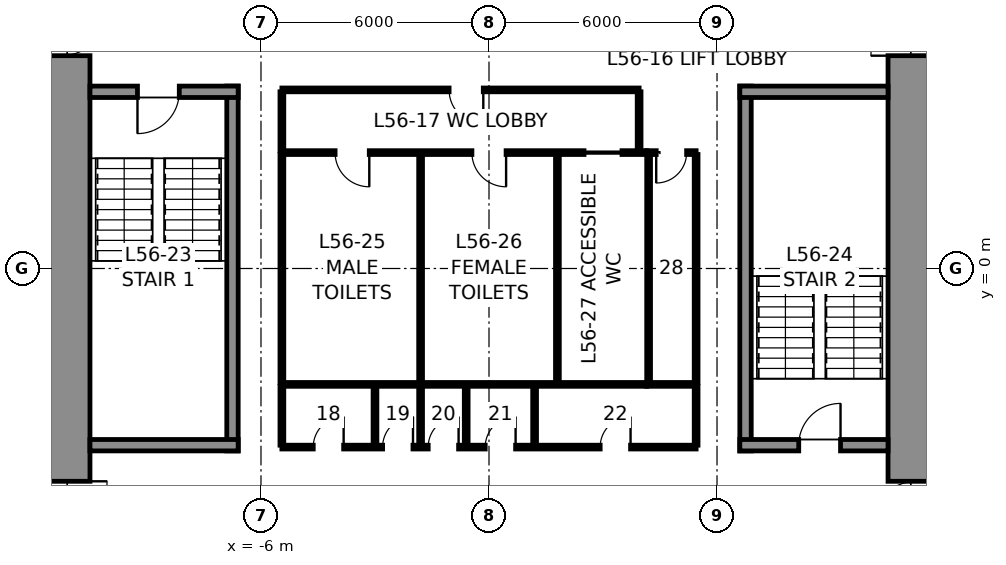
"""IFC4 building model, lengths in metres.
Left out: names, types, materials, properties, quantities, classifications, styles, units other than length and angle.
Written with IfcOpenShell. Run it as: python <this file> out.ifc"""

import sys

from ifc_helpers import new_model, si_unit, direction, frame, frame_2d, origin, place, context, subcontext, project, spatial, rectangle, extrude, element, fill, save


model = new_model("IFC4")
c1 = context("Model", 3, precision=1e-05, world=origin(), true_north=direction((0.0, 1.0)))
c2 = subcontext(c1, "Body", "Model", "MODEL_VIEW")
j1 = project(units=[si_unit("LENGTHUNIT", "METRE"), si_unit("PLANEANGLEUNIT", "RADIAN")], contexts=[c1])
p1 = place(None, origin())
s1 = spatial("IfcSite", under=j1, at=p1, CompositionType="ELEMENT")
p2 = place(p1, origin())
s2 = spatial("IfcBuilding", under=s1, at=p2, CompositionType="ELEMENT")
p3 = place(p2, frame((0.0, 0.0, 253.8)))
s3 = spatial("IfcBuildingStorey", under=s2, at=p3, CompositionType="ELEMENT", Elevation=253.8)
p4 = place(p3, frame((11.25, 10.5, 0.0), z_axis=(0.0, 0.0, 1.0), x_axis=(0.0, -1.0, 0.0)))
e1 = element("IfcWall", 1, at=p4, inside=s3, PredefinedType="SHEAR", context=c2, shape_type="SweptSolid", body=[
    extrude(rectangle(XDim=21.0, YDim=1.5, at=frame_2d((10.5, 0.0))), origin(), (0.0, 0.0, 1.0), 4.0),
])
p5 = place(p4, frame((3.7, 0.0, 0.0)))
e2 = element("IfcOpeningElement", 2, at=p5, cuts=e1, PredefinedType="OPENING", context=c2, shape_type="SweptSolid", body=[
    extrude(rectangle(XDim=1.2, YDim=2.3, at=frame_2d((0.6, 1.15))), frame((0.0, 0.76, 0.0), z_axis=(0.0, -1.0, 0.0), x_axis=(1.0, 0.0, 0.0)), (0.0, 0.0, 1.0), 1.52),
])
p6 = place(p4, frame((16.1, 0.0, 0.0)))
e3 = element("IfcOpeningElement", 3, at=p6, cuts=e1, PredefinedType="OPENING", context=c2, shape_type="SweptSolid", body=[
    extrude(rectangle(XDim=1.2, YDim=2.3, at=frame_2d((0.6, 1.15))), frame((0.0, 0.76, 0.0), z_axis=(0.0, -1.0, 0.0), x_axis=(1.0, 0.0, 0.0)), (0.0, 0.0, 1.0), 1.52),
])
p7 = place(p3, frame((-11.25, -10.5, 0.0), z_axis=(0.0, 0.0, 1.0), x_axis=(0.0, 1.0, 0.0)))
e4 = element("IfcWall", 4, at=p7, inside=s3, PredefinedType="SHEAR", context=c2, shape_type="SweptSolid", body=[
    extrude(rectangle(XDim=21.0, YDim=1.5, at=frame_2d((10.5, 0.0))), origin(), (0.0, 0.0, 1.0), 4.0),
])
p8 = place(p7, frame((16.1, 0.0, 0.0)))
e5 = element("IfcOpeningElement", 5, at=p8, cuts=e4, PredefinedType="OPENING", context=c2, shape_type="SweptSolid", body=[
    extrude(rectangle(XDim=1.2, YDim=2.3, at=frame_2d((0.6, 1.15))), frame((0.0, 0.76, 0.0), z_axis=(0.0, -1.0, 0.0), x_axis=(1.0, 0.0, 0.0)), (0.0, 0.0, 1.0), 1.52),
])
p9 = place(p7, frame((3.7, 0.0, 0.0)))
e6 = element("IfcOpeningElement", 6, at=p9, cuts=e4, PredefinedType="OPENING", context=c2, shape_type="SweptSolid", body=[
    extrude(rectangle(XDim=1.2, YDim=2.3, at=frame_2d((0.6, 1.15))), frame((0.0, 0.76, 0.0), z_axis=(0.0, -1.0, 0.0), x_axis=(1.0, 0.0, 0.0)), (0.0, 0.0, 1.0), 1.52),
])
p10 = place(p3, frame((-6.75, -4.8, 0.0), z_axis=(0.0, 0.0, 1.0), x_axis=(0.0, 1.0, 0.0)))
e7 = element("IfcWall", 7, at=p10, inside=s3, PredefinedType="SOLIDWALL", context=c2, shape_type="SweptSolid", body=[
    extrude(rectangle(XDim=9.6, YDim=0.3, at=frame_2d((4.8, 0.0))), origin(), (0.0, 0.0, 1.0), 3.75),
])
p11 = place(p3, frame((-10.5, 4.65, 0.0), z_axis=(0.0, 0.0, 1.0), x_axis=(1.0, 0.0, 0.0)))
e8 = element("IfcWall", 8, at=p11, inside=s3, PredefinedType="SOLIDWALL", context=c2, shape_type="SweptSolid", body=[
    extrude(rectangle(XDim=3.9, YDim=0.3, at=frame_2d((1.95, 0.0))), origin(), (0.0, 0.0, 1.0), 3.75),
])
p12 = place(p11, frame((1.25, 0.0, 0.0)))
e9 = element("IfcOpeningElement", 9, at=p12, cuts=e8, PredefinedType="OPENING", context=c2, shape_type="SweptSolid", body=[
    extrude(rectangle(XDim=1.1, YDim=2.3, at=frame_2d((0.55, 1.15))), frame((0.0, 0.16, 0.0), z_axis=(0.0, -1.0, 0.0), x_axis=(1.0, 0.0, 0.0)), (0.0, 0.0, 1.0), 0.32),
])
p13 = place(p3, frame((-6.6, -4.65, 0.0), z_axis=(0.0, 0.0, 1.0), x_axis=(-1.0, 0.0, 0.0)))
e10 = element("IfcWall", 10, at=p13, inside=s3, PredefinedType="SOLIDWALL", context=c2, shape_type="SweptSolid", body=[
    extrude(rectangle(XDim=3.9, YDim=0.3, at=frame_2d((1.95, 0.0))), origin(), (0.0, 0.0, 1.0), 3.75),
])
p14 = place(p3, frame((6.75, -4.8, 0.0), z_axis=(0.0, 0.0, 1.0), x_axis=(0.0, 1.0, 0.0)))
e11 = element("IfcWall", 11, at=p14, inside=s3, PredefinedType="SOLIDWALL", context=c2, shape_type="SweptSolid", body=[
    extrude(rectangle(XDim=9.6, YDim=0.3, at=frame_2d((4.8, 0.0))), origin(), (0.0, 0.0, 1.0), 3.75),
])
p15 = place(p3, frame((6.6, 4.65, 0.0), z_axis=(0.0, 0.0, 1.0), x_axis=(1.0, 0.0, 0.0)))
e12 = element("IfcWall", 12, at=p15, inside=s3, PredefinedType="SOLIDWALL", context=c2, shape_type="SweptSolid", body=[
    extrude(rectangle(XDim=3.9, YDim=0.3, at=frame_2d((1.95, 0.0))), origin(), (0.0, 0.0, 1.0), 3.75),
])
p16 = place(p3, frame((10.5, -4.65, 0.0), z_axis=(0.0, 0.0, 1.0), x_axis=(-1.0, 0.0, 0.0)))
e13 = element("IfcWall", 13, at=p16, inside=s3, PredefinedType="SOLIDWALL", context=c2, shape_type="SweptSolid", body=[
    extrude(rectangle(XDim=3.9, YDim=0.3, at=frame_2d((1.95, 0.0))), origin(), (0.0, 0.0, 1.0), 3.75),
])
p17 = place(p16, frame((1.25, 0.0, 0.0)))
e14 = element("IfcOpeningElement", 14, at=p17, cuts=e13, PredefinedType="OPENING", context=c2, shape_type="SweptSolid", body=[
    extrude(rectangle(XDim=1.1, YDim=2.3, at=frame_2d((0.55, 1.15))), frame((0.0, 0.16, 0.0), z_axis=(0.0, -1.0, 0.0), x_axis=(1.0, 0.0, 0.0)), (0.0, 0.0, 1.0), 0.32),
])
p18 = place(p3, frame((-5.45, 3.05, 0.0), z_axis=(0.0, 0.0, 1.0), x_axis=(1.0, 0.0, 0.0)))
e15 = element("IfcWall", 15, at=p18, inside=s3, PredefinedType="PARTITIONING", context=c2, shape_type="SweptSolid", body=[
    extrude(rectangle(XDim=9.6, YDim=0.1, at=frame_2d((4.8, 0.0))), origin(), (0.0, 0.0, 1.0), 3.75),
])
p19 = place(p18, frame((1.4, 0.0, 0.0)))
e16 = element("IfcOpeningElement", 16, at=p19, cuts=e15, PredefinedType="OPENING", context=c2, shape_type="SweptSolid", body=[
    extrude(rectangle(XDim=0.9, YDim=2.3, at=frame_2d((0.45, 1.15))), frame((0.0, 0.06, 0.0), z_axis=(0.0, -1.0, 0.0), x_axis=(1.0, 0.0, 0.0)), (0.0, 0.0, 1.0), 0.12),
])
p20 = place(p18, frame((5.0, 0.0, 0.0)))
e17 = element("IfcOpeningElement", 17, at=p20, cuts=e15, PredefinedType="OPENING", context=c2, shape_type="SweptSolid", body=[
    extrude(rectangle(XDim=0.9, YDim=2.3, at=frame_2d((0.45, 1.15))), frame((0.0, 0.06, 0.0), z_axis=(0.0, -1.0, 0.0), x_axis=(1.0, 0.0, 0.0)), (0.0, 0.0, 1.0), 0.12),
])
p21 = place(p18, frame((7.95, 0.0, 0.0)))
e18 = element("IfcOpeningElement", 18, at=p21, cuts=e15, PredefinedType="OPENING", context=c2, shape_type="SweptSolid", body=[
    extrude(rectangle(XDim=1.0, YDim=2.3, at=frame_2d((0.5, 1.15))), frame((0.0, 0.06, 0.0), z_axis=(0.0, -1.0, 0.0), x_axis=(1.0, 0.0, 0.0)), (0.0, 0.0, 1.0), 0.12),
])
p22 = place(p3, frame((4.15, 3.05, 0.0), z_axis=(0.0, 0.0, 1.0), x_axis=(1.0, 0.0, 0.0)))
e19 = element("IfcWall", 19, at=p22, inside=s3, PredefinedType="PARTITIONING", context=c2, shape_type="SweptSolid", body=[
    extrude(rectangle(XDim=1.3, YDim=0.1, at=frame_2d((0.65, 0.0))), origin(), (0.0, 0.0, 1.0), 3.75),
])
p23 = place(p22, frame((0.25, 0.0, 0.0)))
e20 = element("IfcOpeningElement", 20, at=p23, cuts=e19, PredefinedType="OPENING", context=c2, shape_type="SweptSolid", body=[
    extrude(rectangle(XDim=0.8, YDim=2.3, at=frame_2d((0.4, 1.15))), frame((0.0, 0.06, 0.0), z_axis=(0.0, -1.0, 0.0), x_axis=(1.0, 0.0, 0.0)), (0.0, 0.0, 1.0), 0.12),
])
p24 = place(p3, frame((4.15, -3.05, 0.0), z_axis=(0.0, 0.0, 1.0), x_axis=(-1.0, 0.0, 0.0)))
e21 = element("IfcWall", 21, at=p24, inside=s3, PredefinedType="PARTITIONING", context=c2, shape_type="SweptSolid", body=[
    extrude(rectangle(XDim=9.6, YDim=0.1, at=frame_2d((4.8, 0.0))), origin(), (0.0, 0.0, 1.0), 3.75),
])
p25 = place(p3, frame((5.45, -3.05, 0.0), z_axis=(0.0, 0.0, 1.0), x_axis=(-1.0, 0.0, 0.0)))
e22 = element("IfcWall", 22, at=p25, inside=s3, PredefinedType="PARTITIONING", context=c2, shape_type="SweptSolid", body=[
    extrude(rectangle(XDim=1.3, YDim=0.1, at=frame_2d((0.65, 0.0))), origin(), (0.0, 0.0, 1.0), 3.75),
])
for number, where, z_axis, x_axis in (
    (23, (5.45, 3.0, 0.0), (0.0, 0.0, 1.0), (0.0, -1.0, 0.0)),
    (24, (-5.45, -3.0, 0.0), (0.0, 0.0, 1.0), (0.0, 1.0, 0.0)),
    (25, (-1.8, -3.0, 0.0), (0.0, 0.0, 1.0), (0.0, 1.0, 0.0)),
    (26, (1.8, -3.0, 0.0), (0.0, 0.0, 1.0), (0.0, 1.0, 0.0)),
    (27, (4.2, -3.0, 0.0), (0.0, 0.0, 1.0), (0.0, 1.0, 0.0)),
):
    element("IfcWall", number, at=place(p3, frame(where, z_axis=z_axis, x_axis=x_axis)), inside=s3, PredefinedType="PARTITIONING", context=c2, shape_type="SweptSolid", body=[
        extrude(rectangle(XDim=6.0, YDim=0.1, at=frame_2d((3.0, 0.0))), origin(), (0.0, 0.0, 1.0), 3.75),
    ])
p26 = place(p3, frame((-5.45, 4.7, 0.0), z_axis=(0.0, 0.0, 1.0), x_axis=(1.0, 0.0, 0.0)))
e28 = element("IfcWall", 28, at=p26, inside=s3, PredefinedType="PARTITIONING", context=c2, shape_type="SweptSolid", body=[
    extrude(rectangle(XDim=9.4, YDim=0.1, at=frame_2d((4.7, 0.0))), origin(), (0.0, 0.0, 1.0), 3.75),
])
p27 = place(p26, frame((4.4, 0.0, 0.0)))
e29 = element("IfcOpeningElement", 29, at=p27, cuts=e28, PredefinedType="OPENING", context=c2, shape_type="SweptSolid", body=[
    extrude(rectangle(XDim=0.9, YDim=2.3, at=frame_2d((0.45, 1.15))), frame((0.0, 0.06, 0.0), z_axis=(0.0, -1.0, 0.0), x_axis=(1.0, 0.0, 0.0)), (0.0, 0.0, 1.0), 0.12),
])
for number, where, z_axis, x_axis in (
    (30, (-5.45, 3.1, 0.0), (0.0, 0.0, 1.0), (0.0, 1.0, 0.0)),
    (31, (3.95, 3.1, 0.0), (0.0, 0.0, 1.0), (0.0, 1.0, 0.0)),
):
    element("IfcWall", number, at=place(p3, frame(where, z_axis=z_axis, x_axis=x_axis)), inside=s3, PredefinedType="PARTITIONING", context=c2, shape_type="SweptSolid", body=[
        extrude(rectangle(XDim=1.55, YDim=0.1, at=frame_2d((0.775, 0.0))), origin(), (0.0, 0.0, 1.0), 3.75),
    ])
p28 = place(p3, frame((5.45, -4.7, 0.0), z_axis=(0.0, 0.0, 1.0), x_axis=(-1.0, 0.0, 0.0)))
e32 = element("IfcWall", 32, at=p28, inside=s3, PredefinedType="PARTITIONING", context=c2, shape_type="SweptSolid", body=[
    extrude(rectangle(XDim=10.9, YDim=0.1, at=frame_2d((5.45, 0.0))), origin(), (0.0, 0.0, 1.0), 3.75),
])
p29 = place(p28, frame((9.275, 0.0, 0.0)))
e33 = element("IfcOpeningElement", 33, at=p29, cuts=e32, PredefinedType="OPENING", context=c2, shape_type="SweptSolid", body=[
    extrude(rectangle(XDim=0.8, YDim=2.3, at=frame_2d((0.4, 1.15))), frame((0.0, 0.06, 0.0), z_axis=(0.0, -1.0, 0.0), x_axis=(1.0, 0.0, 0.0)), (0.0, 0.0, 1.0), 0.12),
])
p30 = place(p28, frame((7.45, 0.0, 0.0)))
e34 = element("IfcOpeningElement", 34, at=p30, cuts=e32, PredefinedType="OPENING", context=c2, shape_type="SweptSolid", body=[
    extrude(rectangle(XDim=0.8, YDim=2.3, at=frame_2d((0.4, 1.15))), frame((0.0, 0.06, 0.0), z_axis=(0.0, -1.0, 0.0), x_axis=(1.0, 0.0, 0.0)), (0.0, 0.0, 1.0), 0.12),
])
p31 = place(p28, frame((6.25, 0.0, 0.0)))
e35 = element("IfcOpeningElement", 35, at=p31, cuts=e32, PredefinedType="OPENING", context=c2, shape_type="SweptSolid", body=[
    extrude(rectangle(XDim=0.8, YDim=2.3, at=frame_2d((0.4, 1.15))), frame((0.0, 0.06, 0.0), z_axis=(0.0, -1.0, 0.0), x_axis=(1.0, 0.0, 0.0)), (0.0, 0.0, 1.0), 0.12),
])
p32 = place(p28, frame((4.75, 0.0, 0.0)))
e36 = element("IfcOpeningElement", 36, at=p32, cuts=e32, PredefinedType="OPENING", context=c2, shape_type="SweptSolid", body=[
    extrude(rectangle(XDim=0.8, YDim=2.3, at=frame_2d((0.4, 1.15))), frame((0.0, 0.06, 0.0), z_axis=(0.0, -1.0, 0.0), x_axis=(1.0, 0.0, 0.0)), (0.0, 0.0, 1.0), 0.12),
])
p33 = place(p28, frame((1.725, 0.0, 0.0)))
e37 = element("IfcOpeningElement", 37, at=p33, cuts=e32, PredefinedType="OPENING", context=c2, shape_type="SweptSolid", body=[
    extrude(rectangle(XDim=0.8, YDim=2.3, at=frame_2d((0.4, 1.15))), frame((0.0, 0.06, 0.0), z_axis=(0.0, -1.0, 0.0), x_axis=(1.0, 0.0, 0.0)), (0.0, 0.0, 1.0), 0.12),
])
for number, where, z_axis, x_axis in (
    (38, (-5.45, -3.1, 0.0), (0.0, 0.0, 1.0), (0.0, -1.0, 0.0)),
    (39, (5.45, -3.1, 0.0), (0.0, 0.0, 1.0), (0.0, -1.0, 0.0)),
    (40, (-3.0, -3.1, 0.0), (0.0, 0.0, 1.0), (0.0, -1.0, 0.0)),
    (41, (-1.8, -3.1, 0.0), (0.0, 0.0, 1.0), (0.0, -1.0, 0.0)),
    (42, (-0.6, -3.1, 0.0), (0.0, 0.0, 1.0), (0.0, -1.0, 0.0)),
    (43, (1.2, -3.1, 0.0), (0.0, 0.0, 1.0), (0.0, -1.0, 0.0)),
):
    element("IfcWall", number, at=place(p3, frame(where, z_axis=z_axis, x_axis=x_axis)), inside=s3, PredefinedType="PARTITIONING", context=c2, shape_type="SweptSolid", body=[
        extrude(rectangle(XDim=1.55, YDim=0.1, at=frame_2d((0.775, 0.0))), origin(), (0.0, 0.0, 1.0), 3.75),
    ])
p34 = place(p12, frame((1.1, 0.0, 0.0), z_axis=(0.0, 0.0, 1.0), x_axis=(-1.0, 0.0, 0.0)))
e44 = element("IfcDoor", 44, at=p34, inside=s3, OperationType="SINGLE_SWING_RIGHT", PredefinedType="DOOR", context=c2, shape_type="SweptSolid", body=[
    extrude(rectangle(XDim=1.1, YDim=2.3, at=frame_2d((0.55, 1.15))), frame((0.0, 0.025, 0.0), z_axis=(0.0, -1.0, 0.0), x_axis=(1.0, 0.0, 0.0)), (0.0, 0.0, 1.0), 0.05),
])
fill(e9, e44)
p35 = place(p17, frame((1.1, 0.0, 0.0), z_axis=(0.0, 0.0, 1.0), x_axis=(-1.0, 0.0, 0.0)))
e45 = element("IfcDoor", 45, at=p35, inside=s3, OperationType="SINGLE_SWING_RIGHT", PredefinedType="DOOR", context=c2, shape_type="SweptSolid", body=[
    extrude(rectangle(XDim=1.1, YDim=2.3, at=frame_2d((0.55, 1.15))), frame((0.0, 0.025, 0.0), z_axis=(0.0, -1.0, 0.0), x_axis=(1.0, 0.0, 0.0)), (0.0, 0.0, 1.0), 0.05),
])
fill(e14, e45)
p36 = place(p19, frame((0.9, 0.0, 0.0), z_axis=(0.0, 0.0, 1.0), x_axis=(-1.0, 0.0, 0.0)))
e46 = element("IfcDoor", 46, at=p36, inside=s3, OperationType="SINGLE_SWING_LEFT", PredefinedType="DOOR", context=c2, shape_type="SweptSolid", body=[
    extrude(rectangle(XDim=0.9, YDim=2.3, at=frame_2d((0.45, 1.15))), frame((0.0, 0.025, 0.0), z_axis=(0.0, -1.0, 0.0), x_axis=(1.0, 0.0, 0.0)), (0.0, 0.0, 1.0), 0.05),
])
fill(e16, e46)
p37 = place(p20, frame((0.9, 0.0, 0.0), z_axis=(0.0, 0.0, 1.0), x_axis=(-1.0, 0.0, 0.0)))
e47 = element("IfcDoor", 47, at=p37, inside=s3, OperationType="SINGLE_SWING_LEFT", PredefinedType="DOOR", context=c2, shape_type="SweptSolid", body=[
    extrude(rectangle(XDim=0.9, YDim=2.3, at=frame_2d((0.45, 1.15))), frame((0.0, 0.025, 0.0), z_axis=(0.0, -1.0, 0.0), x_axis=(1.0, 0.0, 0.0)), (0.0, 0.0, 1.0), 0.05),
])
fill(e17, e47)
p38 = place(p21, frame((1.0, 0.0, 0.0), z_axis=(0.0, 0.0, 1.0), x_axis=(-1.0, 0.0, 0.0)))
e48 = element("IfcDoor", 48, at=p38, inside=s3, OperationType="SLIDING_TO_LEFT", PredefinedType="DOOR", context=c2, shape_type="SweptSolid", body=[
    extrude(rectangle(XDim=1.0, YDim=2.3, at=frame_2d((0.5, 1.15))), frame((0.0, 0.025, 0.0), z_axis=(0.0, -1.0, 0.0), x_axis=(1.0, 0.0, 0.0)), (0.0, 0.0, 1.0), 0.05),
])
fill(e18, e48)
p39 = place(p23, frame((0.8, 0.0, 0.0), z_axis=(0.0, 0.0, 1.0), x_axis=(-1.0, 0.0, 0.0)))
e49 = element("IfcDoor", 49, at=p39, inside=s3, OperationType="SINGLE_SWING_RIGHT", PredefinedType="DOOR", context=c2, shape_type="SweptSolid", body=[
    extrude(rectangle(XDim=0.8, YDim=2.3, at=frame_2d((0.4, 1.15))), frame((0.0, 0.025, 0.0), z_axis=(0.0, -1.0, 0.0), x_axis=(1.0, 0.0, 0.0)), (0.0, 0.0, 1.0), 0.05),
])
fill(e20, e49)
p40 = place(p27, frame((0.9, 0.0, 0.0), z_axis=(0.0, 0.0, 1.0), x_axis=(-1.0, 0.0, 0.0)))
e50 = element("IfcDoor", 50, at=p40, inside=s3, OperationType="SINGLE_SWING_LEFT", PredefinedType="DOOR", context=c2, shape_type="SweptSolid", body=[
    extrude(rectangle(XDim=0.9, YDim=2.3, at=frame_2d((0.45, 1.15))), frame((0.0, 0.025, 0.0), z_axis=(0.0, -1.0, 0.0), x_axis=(1.0, 0.0, 0.0)), (0.0, 0.0, 1.0), 0.05),
])
fill(e29, e50)
p41 = place(p29, frame((0.8, 0.0, 0.0), z_axis=(0.0, 0.0, 1.0), x_axis=(-1.0, 0.0, 0.0)))
e51 = element("IfcDoor", 51, at=p41, inside=s3, OperationType="SINGLE_SWING_RIGHT", PredefinedType="DOOR", context=c2, shape_type="SweptSolid", body=[
    extrude(rectangle(XDim=0.8, YDim=2.3, at=frame_2d((0.4, 1.15))), frame((0.0, 0.025, 0.0), z_axis=(0.0, -1.0, 0.0), x_axis=(1.0, 0.0, 0.0)), (0.0, 0.0, 1.0), 0.05),
])
fill(e33, e51)
p42 = place(p30, frame((0.8, 0.0, 0.0), z_axis=(0.0, 0.0, 1.0), x_axis=(-1.0, 0.0, 0.0)))
e52 = element("IfcDoor", 52, at=p42, inside=s3, OperationType="SINGLE_SWING_RIGHT", PredefinedType="DOOR", context=c2, shape_type="SweptSolid", body=[
    extrude(rectangle(XDim=0.8, YDim=2.3, at=frame_2d((0.4, 1.15))), frame((0.0, 0.025, 0.0), z_axis=(0.0, -1.0, 0.0), x_axis=(1.0, 0.0, 0.0)), (0.0, 0.0, 1.0), 0.05),
])
fill(e34, e52)
p43 = place(p31, frame((0.8, 0.0, 0.0), z_axis=(0.0, 0.0, 1.0), x_axis=(-1.0, 0.0, 0.0)))
e53 = element("IfcDoor", 53, at=p43, inside=s3, OperationType="SINGLE_SWING_RIGHT", PredefinedType="DOOR", context=c2, shape_type="SweptSolid", body=[
    extrude(rectangle(XDim=0.8, YDim=2.3, at=frame_2d((0.4, 1.15))), frame((0.0, 0.025, 0.0), z_axis=(0.0, -1.0, 0.0), x_axis=(1.0, 0.0, 0.0)), (0.0, 0.0, 1.0), 0.05),
])
fill(e35, e53)
p44 = place(p32, frame((0.8, 0.0, 0.0), z_axis=(0.0, 0.0, 1.0), x_axis=(-1.0, 0.0, 0.0)))
e54 = element("IfcDoor", 54, at=p44, inside=s3, OperationType="SINGLE_SWING_RIGHT", PredefinedType="DOOR", context=c2, shape_type="SweptSolid", body=[
    extrude(rectangle(XDim=0.8, YDim=2.3, at=frame_2d((0.4, 1.15))), frame((0.0, 0.025, 0.0), z_axis=(0.0, -1.0, 0.0), x_axis=(1.0, 0.0, 0.0)), (0.0, 0.0, 1.0), 0.05),
])
fill(e36, e54)
p45 = place(p33, frame((0.8, 0.0, 0.0), z_axis=(0.0, 0.0, 1.0), x_axis=(-1.0, 0.0, 0.0)))
e55 = element("IfcDoor", 55, at=p45, inside=s3, OperationType="SINGLE_SWING_RIGHT", PredefinedType="DOOR", context=c2, shape_type="SweptSolid", body=[
    extrude(rectangle(XDim=0.8, YDim=2.3, at=frame_2d((0.4, 1.15))), frame((0.0, 0.025, 0.0), z_axis=(0.0, -1.0, 0.0), x_axis=(1.0, 0.0, 0.0)), (0.0, 0.0, 1.0), 0.05),
])
fill(e37, e55)
p46 = place(p8, frame((1.2, 0.0, 0.0), z_axis=(0.0, 0.0, 1.0), x_axis=(-1.0, 0.0, 0.0)))
e56 = element("IfcDoor", 56, at=p46, inside=s3, OperationType="SINGLE_SWING_LEFT", PredefinedType="DOOR", context=c2, shape_type="SweptSolid", body=[
    extrude(rectangle(XDim=1.2, YDim=2.3, at=frame_2d((0.6, 1.15))), frame((0.0, 0.025, 0.0), z_axis=(0.0, -1.0, 0.0), x_axis=(1.0, 0.0, 0.0)), (0.0, 0.0, 1.0), 0.05),
])
fill(e5, e56)
p47 = place(p9, frame((1.2, 0.0, 0.0), z_axis=(0.0, 0.0, 1.0), x_axis=(-1.0, 0.0, 0.0)))
e57 = element("IfcDoor", 57, at=p47, inside=s3, OperationType="SINGLE_SWING_LEFT", PredefinedType="DOOR", context=c2, shape_type="SweptSolid", body=[
    extrude(rectangle(XDim=1.2, YDim=2.3, at=frame_2d((0.6, 1.15))), frame((0.0, 0.025, 0.0), z_axis=(0.0, -1.0, 0.0), x_axis=(1.0, 0.0, 0.0)), (0.0, 0.0, 1.0), 0.05),
])
fill(e6, e57)
p48 = place(p5, frame((1.2, 0.0, 0.0), z_axis=(0.0, 0.0, 1.0), x_axis=(-1.0, 0.0, 0.0)))
e58 = element("IfcDoor", 58, at=p48, inside=s3, OperationType="SINGLE_SWING_LEFT", PredefinedType="DOOR", context=c2, shape_type="SweptSolid", body=[
    extrude(rectangle(XDim=1.2, YDim=2.3, at=frame_2d((0.6, 1.15))), frame((0.0, 0.025, 0.0), z_axis=(0.0, -1.0, 0.0), x_axis=(1.0, 0.0, 0.0)), (0.0, 0.0, 1.0), 0.05),
])
fill(e2, e58)
p49 = place(p6, frame((1.2, 0.0, 0.0), z_axis=(0.0, 0.0, 1.0), x_axis=(-1.0, 0.0, 0.0)))
e59 = element("IfcDoor", 59, at=p49, inside=s3, OperationType="SINGLE_SWING_LEFT", PredefinedType="DOOR", context=c2, shape_type="SweptSolid", body=[
    extrude(rectangle(XDim=1.2, YDim=2.3, at=frame_2d((0.6, 1.15))), frame((0.0, 0.025, 0.0), z_axis=(0.0, -1.0, 0.0), x_axis=(1.0, 0.0, 0.0)), (0.0, 0.0, 1.0), 0.05),
])
fill(e3, e59)
save(model, sys.argv[1])
